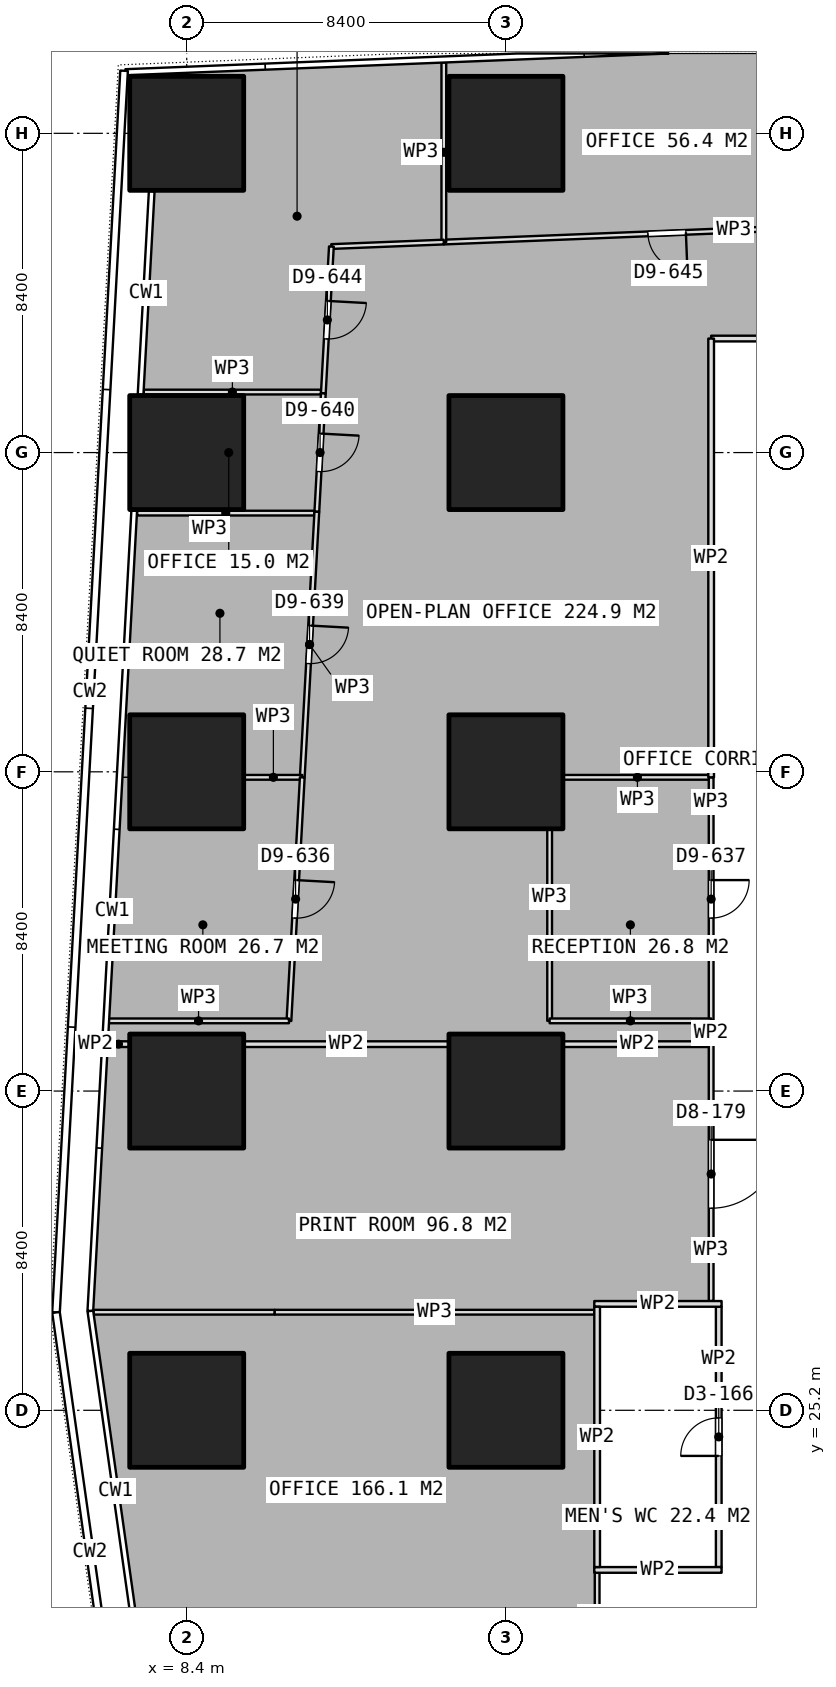
"""IFC4 building model, lengths in metres.
Left out: names, types, materials, properties, quantities, classifications, styles, units other than length and angle.
Written with IfcOpenShell. Run it as: python <this file> out.ifc"""

import sys

from ifc_helpers import new_model, si_unit, direction, frame, frame_2d, origin, origin_2d, place, context, subcontext, project, spatial, rectangle, extrude, element, fill, save


model = new_model("IFC4")
c1 = context("Model", 3, precision=1e-05, world=origin(), true_north=direction((0.0, 1.0)))
c2 = subcontext(c1, "Body", "Model", "MODEL_VIEW")
j1 = project(units=[si_unit("LENGTHUNIT", "METRE"), si_unit("PLANEANGLEUNIT", "RADIAN")], contexts=[c1])
p1 = place(None, origin())
s1 = spatial("IfcSite", under=j1, at=p1, CompositionType="ELEMENT")
p2 = place(p1, origin())
s2 = spatial("IfcBuilding", under=s1, at=p2, CompositionType="ELEMENT")
p3 = place(p2, frame((0.0, 0.0, 155.3)))
s3 = spatial("IfcBuildingStorey", under=s2, at=p3, CompositionType="ELEMENT", Elevation=155.3)
for number, where, z_axis, x_axis in (
    (1, (8.4, 25.2, 0.0), (0.0, 0.0, 1.0), (1.0, 0.0, 0.0)),
    (2, (8.4, 33.6, 0.0), (0.0, 0.0, 1.0), (1.0, 0.0, 0.0)),
    (3, (8.4, 42.0, 0.0), (0.0, 0.0, 1.0), (1.0, 0.0, 0.0)),
    (4, (8.4, 50.4, 0.0), (0.0, 0.0, 1.0), (1.0, 0.0, 0.0)),
    (5, (8.4, 58.8, 0.0), (0.0, 0.0, 1.0), (1.0, 0.0, 0.0)),
    (6, (16.8, 25.2, 0.0), (0.0, 0.0, 1.0), (1.0, 0.0, 0.0)),
    (7, (16.8, 33.6, 0.0), (0.0, 0.0, 1.0), (1.0, 0.0, 0.0)),
    (8, (16.8, 42.0, 0.0), (0.0, 0.0, 1.0), (1.0, 0.0, 0.0)),
    (9, (16.8, 50.4, 0.0), (0.0, 0.0, 1.0), (1.0, 0.0, 0.0)),
    (10, (16.8, 58.8, 0.0), (0.0, 0.0, 1.0), (1.0, 0.0, 0.0)),
):
    element("IfcColumn", number, at=place(p3, frame(where, z_axis=z_axis, x_axis=x_axis)), inside=s3, PredefinedType="COLUMN", context=c2, shape_type="SweptSolid", body=[
        extrude(rectangle(XDim=3.0, YDim=3.0, at=origin_2d()), origin(), (0.0, 0.0, 1.0), 3.75),
    ])
for number, where, z_axis, x_axis in (
    (11, (19.125, 21.0, 0.0), (0.0, 0.0, 1.0), (1.0, 0.0, 0.0)),
    (12, (19.125, 28.0, 0.0), (0.0, 0.0, 1.0), (1.0, 0.0, 0.0)),
):
    element("IfcWall", number, at=place(p3, frame(where, z_axis=z_axis, x_axis=x_axis)), inside=s3, PredefinedType="PARTITIONING", context=c2, shape_type="SweptSolid", body=[
        extrude(rectangle(XDim=3.35, YDim=0.15, at=frame_2d((1.675, 0.0))), origin(), (0.0, 0.0, 1.0), 3.5),
    ])
p4 = place(p3, frame((19.2, 21.075, 0.0), z_axis=(0.0, 0.0, 1.0), x_axis=(0.0, 1.0, 0.0)))
e13 = element("IfcWall", 13, at=p4, inside=s3, PredefinedType="PARTITIONING", context=c2, shape_type="SweptSolid", body=[
    extrude(rectangle(XDim=6.85, YDim=0.15, at=frame_2d((3.425, 0.0))), origin(), (0.0, 0.0, 1.0), 3.5),
])
p5 = place(p3, frame((22.4, 21.075, 0.0), z_axis=(0.0, 0.0, 1.0), x_axis=(0.0, 1.0, 0.0)))
e14 = element("IfcWall", 14, at=p5, inside=s3, PredefinedType="PARTITIONING", context=c2, shape_type="SweptSolid", body=[
    extrude(rectangle(XDim=6.85, YDim=0.15, at=frame_2d((3.425, 0.0))), origin(), (0.0, 0.0, 1.0), 3.5),
])
p6 = place(p5, frame((2.925, 0.0, 0.0)))
e15 = element("IfcOpeningElement", 15, at=p6, cuts=e14, PredefinedType="OPENING", context=c2, shape_type="SweptSolid", body=[
    extrude(rectangle(XDim=1.0, YDim=2.1, at=frame_2d((0.5, 1.05))), frame((0.0, 0.085, 0.0), z_axis=(0.0, -1.0, 0.0), x_axis=(1.0, 0.0, 0.0)), (0.0, 0.0, 1.0), 0.17),
])
p7 = place(p3, frame((5.949, 27.781, 0.0), z_axis=(0.0, 0.0, 1.0), x_axis=(1.0, 0.0, 0.0)))
e16 = element("IfcWall", 16, at=p7, inside=s3, PredefinedType="PARTITIONING", context=c2, shape_type="SweptSolid", body=[
    extrude(rectangle(XDim=4.767, YDim=0.125, at=frame_2d((2.384, 0.0))), origin(), (0.0, 0.0, 1.0), 3.5),
])
p8 = place(p3, frame((10.716, 27.781, 0.0), z_axis=(0.0, 0.0, 1.0), x_axis=(1.0, 0.0, 0.0)))
e17 = element("IfcWall", 17, at=p8, inside=s3, PredefinedType="PARTITIONING", context=c2, shape_type="SweptSolid", body=[
    extrude(rectangle(XDim=8.409, YDim=0.125, at=frame_2d((4.205, 0.0))), origin(), (0.0, 0.0, 1.0), 3.5),
])
p9 = place(p3, frame((19.2, 21.075, 0.0), z_axis=(0.0, 0.0, 1.0), x_axis=(0.0, -1.0, 0.0)))
e18 = element("IfcWall", 18, at=p9, inside=s3, PredefinedType="PARTITIONING", context=c2, shape_type="SweptSolid", body=[
    extrude(rectangle(XDim=2.625, YDim=0.125, at=frame_2d((1.312, 0.0))), origin(), (0.0, 0.0, 1.0), 3.5),
])
p10 = place(p3, frame((26.906, 56.41, 0.0), z_axis=(0.0, 0.0, 1.0), x_axis=(-0.999196371501, -0.04008255455, 0.0)))
e19 = element("IfcWall", 19, at=p10, inside=s3, PredefinedType="PARTITIONING", context=c2, shape_type="SweptSolid", body=[
    extrude(rectangle(XDim=11.75, YDim=0.125, at=frame_2d((5.875, 0.0))), origin(), (0.0, 0.0, 1.0), 3.5),
])
p11 = place(p10, frame((5.375, 0.0, 0.0)))
e20 = element("IfcOpeningElement", 20, at=p11, cuts=e19, PredefinedType="OPENING", context=c2, shape_type="SweptSolid", body=[
    extrude(rectangle(XDim=1.0, YDim=2.1, at=frame_2d((0.5, 1.05))), frame((0.0, 0.073, 0.0), z_axis=(0.0, -1.0, 0.0), x_axis=(1.0, 0.0, 0.0)), (0.0, 0.0, 1.0), 0.145),
])
p12 = place(p3, frame((15.166, 55.939, 0.0), z_axis=(0.0, 0.0, 1.0), x_axis=(0.0, 1.0, 0.0)))
e21 = element("IfcWall", 21, at=p12, inside=s3, PredefinedType="PARTITIONING", context=c2, shape_type="SweptSolid", body=[
    extrude(rectangle(XDim=4.724, YDim=0.125, at=frame_2d((2.362, 0.0))), origin(), (0.0, 0.0, 1.0), 3.5),
])
p13 = place(p3, frame((11.934, 51.992, 0.0), z_axis=(0.0, 0.0, 1.0), x_axis=(-1.0, 0.0, 0.0)))
e22 = element("IfcWall", 22, at=p13, inside=s3, PredefinedType="PARTITIONING", context=c2, shape_type="SweptSolid", body=[
    extrude(rectangle(XDim=4.664, YDim=0.125, at=frame_2d((2.332, 0.0))), origin(), (0.0, 0.0, 1.0), 3.5),
])
p14 = place(p3, frame((15.165, 55.939, 0.0), z_axis=(0.0, 0.0, 1.0), x_axis=(-0.999206350986, -0.039833003262, 0.0)))
e23 = element("IfcWall", 23, at=p14, inside=s3, PredefinedType="PARTITIONING", context=c2, shape_type="SweptSolid", body=[
    extrude(rectangle(XDim=2.96, YDim=0.125, at=frame_2d((1.48, 0.0))), origin(), (0.0, 0.0, 1.0), 3.5),
])
p15 = place(p3, frame((12.207, 55.821, 0.0), z_axis=(0.0, 0.0, 1.0), x_axis=(-0.054774500105, -0.998498750194, 0.0)))
e24 = element("IfcWall", 24, at=p15, inside=s3, PredefinedType="PARTITIONING", context=c2, shape_type="SweptSolid", body=[
    extrude(rectangle(XDim=3.869, YDim=0.125, at=frame_2d((1.935, 0.0))), origin(), (0.0, 0.0, 1.0), 3.5),
])
p16 = place(p15, frame((1.434, 0.0, 0.0)))
e25 = element("IfcOpeningElement", 25, at=p16, cuts=e24, PredefinedType="OPENING", context=c2, shape_type="SweptSolid", body=[
    extrude(rectangle(XDim=1.0, YDim=2.1, at=frame_2d((0.5, 1.05))), frame((0.0, 0.073, 0.0), z_axis=(0.0, -1.0, 0.0), x_axis=(1.0, 0.0, 0.0)), (0.0, 0.0, 1.0), 0.145),
])
p17 = place(p3, frame((11.995, 51.957, 0.0), z_axis=(0.0, 0.0, 1.0), x_axis=(-0.05487602635, -0.998493175606, 0.0)))
e26 = element("IfcWall", 26, at=p17, inside=s3, PredefinedType="PARTITIONING", context=c2, shape_type="SweptSolid", body=[
    extrude(rectangle(XDim=3.119, YDim=0.125, at=frame_2d((1.559, 0.0))), origin(), (0.0, 0.0, 1.0), 3.5),
])
p18 = place(p17, frame((1.059, 0.0, 0.0)))
e27 = element("IfcOpeningElement", 27, at=p18, cuts=e26, PredefinedType="OPENING", context=c2, shape_type="SweptSolid", body=[
    extrude(rectangle(XDim=1.0, YDim=2.1, at=frame_2d((0.5, 1.05))), frame((0.0, 0.073, 0.0), z_axis=(0.0, -1.0, 0.0), x_axis=(1.0, 0.0, 0.0)), (0.0, 0.0, 1.0), 0.145),
])
p19 = place(p3, frame((11.759, 48.807, 0.0), z_axis=(0.0, 0.0, 1.0), x_axis=(-1.0, 0.0, 0.0)))
e28 = element("IfcWall", 28, at=p19, inside=s3, PredefinedType="PARTITIONING", context=c2, shape_type="SweptSolid", body=[
    extrude(rectangle(XDim=4.664, YDim=0.125, at=frame_2d((2.332, 0.0))), origin(), (0.0, 0.0, 1.0), 3.5),
])
p20 = place(p3, frame((11.824, 48.842, 0.0), z_axis=(0.0, 0.0, 1.0), x_axis=(-0.054741513587, -0.998500559184, 0.0)))
e29 = element("IfcWall", 29, at=p20, inside=s3, PredefinedType="PARTITIONING", context=c2, shape_type="SweptSolid", body=[
    extrude(rectangle(XDim=6.998, YDim=0.125, at=frame_2d((3.499, 0.0))), origin(), (0.0, 0.0, 1.0), 3.5),
])
p21 = place(p20, frame((2.999, 0.0, 0.0)))
e30 = element("IfcOpeningElement", 30, at=p21, cuts=e29, PredefinedType="OPENING", context=c2, shape_type="SweptSolid", body=[
    extrude(rectangle(XDim=1.0, YDim=2.1, at=frame_2d((0.5, 1.05))), frame((0.0, 0.073, 0.0), z_axis=(0.0, -1.0, 0.0), x_axis=(1.0, 0.0, 0.0)), (0.0, 0.0, 1.0), 0.145),
])
p22 = place(p3, frame((11.441, 41.855, 0.0), z_axis=(0.0, 0.0, 1.0), x_axis=(-1.0, 0.0, 0.0)))
e31 = element("IfcWall", 31, at=p22, inside=s3, PredefinedType="PARTITIONING", context=c2, shape_type="SweptSolid", body=[
    extrude(rectangle(XDim=1.521, YDim=0.125, at=frame_2d((0.76, 0.0))), origin(), (0.0, 0.0, 1.0), 3.5),
])
p23 = place(p3, frame((11.441, 41.854, 0.0), z_axis=(0.0, 0.0, 1.0), x_axis=(-0.054675551462, -0.998504173287, 0.0)))
e32 = element("IfcWall", 32, at=p23, inside=s3, PredefinedType="PARTITIONING", context=c2, shape_type="SweptSolid", body=[
    extrude(rectangle(XDim=6.417, YDim=0.125, at=frame_2d((3.208, 0.0))), origin(), (0.0, 0.0, 1.0), 3.5),
])
p24 = place(p23, frame((2.708, 0.0, 0.0)))
e33 = element("IfcOpeningElement", 33, at=p24, cuts=e32, PredefinedType="OPENING", context=c2, shape_type="SweptSolid", body=[
    extrude(rectangle(XDim=1.0, YDim=2.1, at=frame_2d((0.5, 1.05))), frame((0.0, 0.073, 0.0), z_axis=(0.0, -1.0, 0.0), x_axis=(1.0, 0.0, 0.0)), (0.0, 0.0, 1.0), 0.145),
])
p25 = place(p3, frame((11.09, 35.447, 0.0), z_axis=(0.0, 0.0, 1.0), x_axis=(-1.0, 0.0, 0.0)))
e34 = element("IfcWall", 34, at=p25, inside=s3, PredefinedType="PARTITIONING", context=c2, shape_type="SweptSolid", body=[
    extrude(rectangle(XDim=4.757, YDim=0.125, at=frame_2d((2.378, 0.0))), origin(), (0.0, 0.0, 1.0), 3.5),
])
p26 = place(p3, frame((17.95, 35.447, 0.0), z_axis=(0.0, 0.0, 1.0), x_axis=(0.0, 1.0, 0.0)))
e35 = element("IfcWall", 35, at=p26, inside=s3, PredefinedType="PARTITIONING", context=c2, shape_type="SweptSolid", body=[
    extrude(rectangle(XDim=5.033, YDim=0.125, at=frame_2d((2.517, 0.0))), origin(), (0.0, 0.0, 1.0), 3.5),
])
p27 = place(p3, frame((18.32, 41.855, 0.0), z_axis=(0.0, 0.0, 1.0), x_axis=(1.0, 0.0, 0.0)))
e36 = element("IfcWall", 36, at=p27, inside=s3, PredefinedType="PARTITIONING", context=c2, shape_type="SweptSolid", body=[
    extrude(rectangle(XDim=3.88, YDim=0.125, at=frame_2d((1.94, 0.0))), origin(), (0.0, 0.0, 1.0), 3.5),
])
p28 = place(p3, frame((22.2, 41.855, 0.0), z_axis=(0.0, 0.0, 1.0), x_axis=(0.0, -1.0, 0.0)))
e37 = element("IfcWall", 37, at=p28, inside=s3, PredefinedType="PARTITIONING", context=c2, shape_type="SweptSolid", body=[
    extrude(rectangle(XDim=6.408, YDim=0.125, at=frame_2d((3.204, 0.0))), origin(), (0.0, 0.0, 1.0), 3.5),
])
p29 = place(p28, frame((2.704, 0.0, 0.0)))
e38 = element("IfcOpeningElement", 38, at=p29, cuts=e37, PredefinedType="OPENING", context=c2, shape_type="SweptSolid", body=[
    extrude(rectangle(XDim=1.0, YDim=2.1, at=frame_2d((0.5, 1.05))), frame((0.0, 0.073, 0.0), z_axis=(0.0, -1.0, 0.0), x_axis=(1.0, 0.0, 0.0)), (0.0, 0.0, 1.0), 0.145),
])
p30 = place(p3, frame((22.2, 35.447, 0.0), z_axis=(0.0, 0.0, 1.0), x_axis=(-1.0, 0.0, 0.0)))
e39 = element("IfcWall", 39, at=p30, inside=s3, PredefinedType="PARTITIONING", context=c2, shape_type="SweptSolid", body=[
    extrude(rectangle(XDim=4.25, YDim=0.125, at=frame_2d((2.125, 0.0))), origin(), (0.0, 0.0, 1.0), 3.5),
])
p31 = place(p3, frame((22.2, 35.447, 0.0), z_axis=(0.0, 0.0, 1.0), x_axis=(0.0, -1.0, 0.0)))
e40 = element("IfcWall", 40, at=p31, inside=s3, PredefinedType="PARTITIONING", context=c2, shape_type="SweptSolid", body=[
    extrude(rectangle(XDim=0.613, YDim=0.15, at=frame_2d((0.307, 0.0))), origin(), (0.0, 0.0, 1.0), 3.5),
])
p32 = place(p3, frame((22.2, 34.834, 0.0), z_axis=(0.0, 0.0, 1.0), x_axis=(-1.0, 0.0, 0.0)))
e41 = element("IfcWall", 41, at=p32, inside=s3, PredefinedType="PARTITIONING", context=c2, shape_type="SweptSolid", body=[
    extrude(rectangle(XDim=3.88, YDim=0.15, at=frame_2d((1.94, 0.0))), origin(), (0.0, 0.0, 1.0), 3.5),
])
p33 = place(p3, frame((15.28, 34.834, 0.0), z_axis=(0.0, 0.0, 1.0), x_axis=(-1.0, 0.0, 0.0)))
e42 = element("IfcWall", 42, at=p33, inside=s3, PredefinedType="PARTITIONING", context=c2, shape_type="SweptSolid", body=[
    extrude(rectangle(XDim=5.36, YDim=0.15, at=frame_2d((2.68, 0.0))), origin(), (0.0, 0.0, 1.0), 3.5),
])
p34 = place(p3, frame((6.88, 34.834, 0.0), z_axis=(0.0, 0.0, 1.0), x_axis=(-1.0, 0.0, 0.0)))
e43 = element("IfcWall", 43, at=p34, inside=s3, PredefinedType="PARTITIONING", context=c2, shape_type="SweptSolid", body=[
    extrude(rectangle(XDim=0.551, YDim=0.15, at=frame_2d((0.275, 0.0))), origin(), (0.0, 0.0, 1.0), 3.5),
])
p35 = place(p3, frame((33.826, 53.4, 0.0), z_axis=(0.0, 0.0, 1.0), x_axis=(-1.0, 0.0, 0.0)))
e44 = element("IfcWall", 44, at=p35, inside=s3, PredefinedType="PARTITIONING", context=c2, shape_type="SweptSolid", body=[
    extrude(rectangle(XDim=11.626, YDim=0.15, at=frame_2d((5.813, 0.0))), origin(), (0.0, 0.0, 1.0), 3.5),
])
p36 = place(p35, frame((5.313, 0.0, 0.0)))
e45 = element("IfcOpeningElement", 45, at=p36, cuts=e44, PredefinedType="OPENING", context=c2, shape_type="SweptSolid", body=[
    extrude(rectangle(XDim=1.0, YDim=2.1, at=frame_2d((0.5, 1.05))), frame((0.0, 0.085, 0.0), z_axis=(0.0, -1.0, 0.0), x_axis=(1.0, 0.0, 0.0)), (0.0, 0.0, 1.0), 0.17),
])
p37 = place(p3, frame((22.2, 53.4, 0.0), z_axis=(0.0, 0.0, 1.0), x_axis=(0.0, -1.0, 0.0)))
e46 = element("IfcWall", 46, at=p37, inside=s3, PredefinedType="PARTITIONING", context=c2, shape_type="SweptSolid", body=[
    extrude(rectangle(XDim=11.545, YDim=0.15, at=frame_2d((5.772, 0.0))), origin(), (0.0, 0.0, 1.0), 3.5),
])
p38 = place(p3, frame((22.2, 34.834, 0.0), z_axis=(0.0, 0.0, 1.0), x_axis=(0.0, -1.0, 0.0)))
e47 = element("IfcWall", 47, at=p38, inside=s3, PredefinedType="PARTITIONING", context=c2, shape_type="SweptSolid", body=[
    extrude(rectangle(XDim=6.759, YDim=0.125, at=frame_2d((3.379, 0.0))), origin(), (0.0, 0.0, 1.0), 3.5),
])
p39 = place(p38, frame((2.517, 0.0, 0.0)))
e48 = element("IfcOpeningElement", 48, at=p39, cuts=e47, PredefinedType="OPENING", context=c2, shape_type="SweptSolid", body=[
    extrude(rectangle(XDim=1.8, YDim=2.1, at=frame_2d((0.9, 1.05))), frame((0.0, 0.073, 0.0), z_axis=(0.0, -1.0, 0.0), x_axis=(1.0, 0.0, 0.0)), (0.0, 0.0, 1.0), 0.145),
])
p40 = place(p6, origin())
e49 = element("IfcDoor", 49, at=p40, inside=s3, OperationType="SINGLE_SWING_LEFT", PredefinedType="DOOR", context=c2, shape_type="SweptSolid", body=[
    extrude(rectangle(XDim=1.0, YDim=2.1, at=frame_2d((0.5, 1.05))), frame((0.0, 0.025, 0.0), z_axis=(0.0, -1.0, 0.0), x_axis=(1.0, 0.0, 0.0)), (0.0, 0.0, 1.0), 0.05),
])
fill(e15, e49)
p41 = place(p11, origin())
e50 = element("IfcDoor", 50, at=p41, inside=s3, OperationType="SINGLE_SWING_LEFT", PredefinedType="DOOR", context=c2, shape_type="SweptSolid", body=[
    extrude(rectangle(XDim=1.0, YDim=2.1, at=frame_2d((0.5, 1.05))), frame((0.0, 0.025, 0.0), z_axis=(0.0, -1.0, 0.0), x_axis=(1.0, 0.0, 0.0)), (0.0, 0.0, 1.0), 0.05),
])
fill(e20, e50)
p42 = place(p16, origin())
e51 = element("IfcDoor", 51, at=p42, inside=s3, OperationType="SINGLE_SWING_LEFT", PredefinedType="DOOR", context=c2, shape_type="SweptSolid", body=[
    extrude(rectangle(XDim=1.0, YDim=2.1, at=frame_2d((0.5, 1.05))), frame((0.0, 0.025, 0.0), z_axis=(0.0, -1.0, 0.0), x_axis=(1.0, 0.0, 0.0)), (0.0, 0.0, 1.0), 0.05),
])
fill(e25, e51)
p43 = place(p18, origin())
e52 = element("IfcDoor", 52, at=p43, inside=s3, OperationType="SINGLE_SWING_LEFT", PredefinedType="DOOR", context=c2, shape_type="SweptSolid", body=[
    extrude(rectangle(XDim=1.0, YDim=2.1, at=frame_2d((0.5, 1.05))), frame((0.0, 0.025, 0.0), z_axis=(0.0, -1.0, 0.0), x_axis=(1.0, 0.0, 0.0)), (0.0, 0.0, 1.0), 0.05),
])
fill(e27, e52)
p44 = place(p21, origin())
e53 = element("IfcDoor", 53, at=p44, inside=s3, OperationType="SINGLE_SWING_LEFT", PredefinedType="DOOR", context=c2, shape_type="SweptSolid", body=[
    extrude(rectangle(XDim=1.0, YDim=2.1, at=frame_2d((0.5, 1.05))), frame((0.0, 0.025, 0.0), z_axis=(0.0, -1.0, 0.0), x_axis=(1.0, 0.0, 0.0)), (0.0, 0.0, 1.0), 0.05),
])
fill(e30, e53)
p45 = place(p24, origin())
e54 = element("IfcDoor", 54, at=p45, inside=s3, OperationType="SINGLE_SWING_LEFT", PredefinedType="DOOR", context=c2, shape_type="SweptSolid", body=[
    extrude(rectangle(XDim=1.0, YDim=2.1, at=frame_2d((0.5, 1.05))), frame((0.0, 0.025, 0.0), z_axis=(0.0, -1.0, 0.0), x_axis=(1.0, 0.0, 0.0)), (0.0, 0.0, 1.0), 0.05),
])
fill(e33, e54)
p46 = place(p29, origin())
e55 = element("IfcDoor", 55, at=p46, inside=s3, OperationType="SINGLE_SWING_LEFT", PredefinedType="DOOR", context=c2, shape_type="SweptSolid", body=[
    extrude(rectangle(XDim=1.0, YDim=2.1, at=frame_2d((0.5, 1.05))), frame((0.0, 0.025, 0.0), z_axis=(0.0, -1.0, 0.0), x_axis=(1.0, 0.0, 0.0)), (0.0, 0.0, 1.0), 0.05),
])
fill(e38, e55)
p47 = place(p39, origin())
e56 = element("IfcDoor", 56, at=p47, inside=s3, OperationType="DOUBLE_DOOR_SINGLE_SWING", PredefinedType="DOOR", context=c2, shape_type="SweptSolid", body=[
    extrude(rectangle(XDim=1.8, YDim=2.1, at=frame_2d((0.9, 1.05))), frame((0.0, 0.025, 0.0), z_axis=(0.0, -1.0, 0.0), x_axis=(1.0, 0.0, 0.0)), (0.0, 0.0, 1.0), 0.05),
])
fill(e48, e56)
save(model, sys.argv[1])
